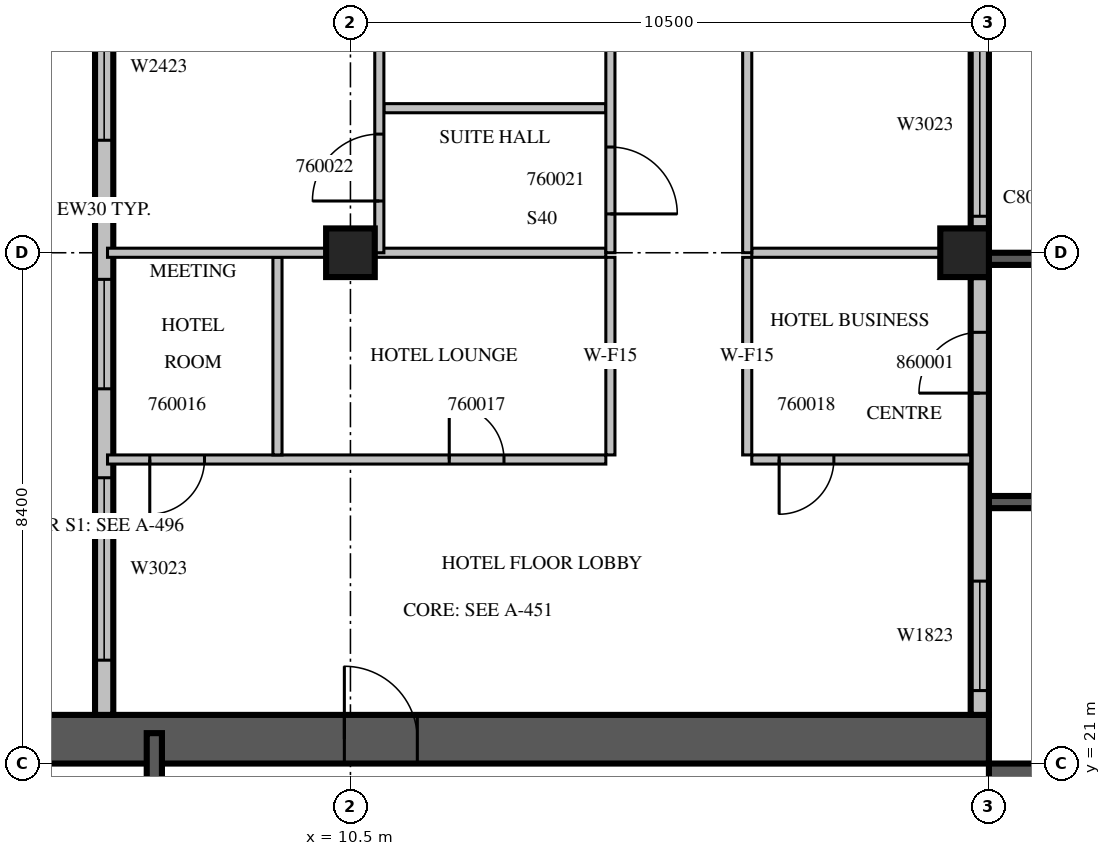
"""IFC4 building model, lengths in metres.
Left out: names, types, materials, properties, quantities, classifications, styles, units other than length and angle.
Written with IfcOpenShell. Run it as: python <this file> out.ifc"""

import sys

from ifc_helpers import new_model, si_unit, direction, frame, frame_2d, origin, origin_2d, place, context, subcontext, project, spatial, rectangle, extrude, source, transform, mapped, element, fill, save


model = new_model("IFC4")
c1 = context("Model", 3, precision=1e-05, world=origin(), true_north=direction((0.0, 1.0)))
c2 = subcontext(c1, "Body", "Model", "MODEL_VIEW")
j1 = project(units=[si_unit("LENGTHUNIT", "METRE"), si_unit("PLANEANGLEUNIT", "RADIAN")], contexts=[c1])
p1 = place(None, origin())
s1 = spatial("IfcSite", under=j1, at=p1, CompositionType="ELEMENT")
p2 = place(p1, origin())
s2 = spatial("IfcBuilding", under=s1, at=p2, CompositionType="ELEMENT")
p3 = place(p2, frame((0.0, 0.0, 261.4)))
s3 = spatial("IfcBuildingStorey", under=s2, at=p3, CompositionType="ELEMENT", Elevation=261.4)
m1 = source(origin(), c2, "Body", "SweptSolid", [
    extrude(rectangle(XDim=0.8, YDim=0.8, at=origin_2d()), origin(), (0.0, 0.0, 1.0), 3.8),
])
for number, where, z_axis, x_axis in (
    (1, (10.5, 29.4, 0.0), (0.0, 0.0, 1.0), (1.0, 0.0, 0.0)),
    (2, (20.6, 29.4, 0.0), (0.0, 0.0, 1.0), (1.0, 0.0, 0.0)),
):
    element("IfcColumn", number, at=place(p3, frame(where, z_axis=z_axis, x_axis=x_axis)), inside=s3, PredefinedType="COLUMN", context=c2, shape_type="MappedRepresentation", body=[
        mapped(m1, transform((0.0, 0.0, 0.0), scale=1.0)),
    ])
m2 = source(origin(), c2, "Body", "SweptSolid", [
    extrude(rectangle(XDim=16.8, YDim=0.8, at=frame_2d((8.4, 0.0))), origin(), (0.0, 0.0, 1.0), 3.8),
])
p4 = place(p3, frame((21.4, 4.2, 0.0), z_axis=(0.0, 0.0, 1.0), x_axis=(0.0, 1.0, 0.0)))
e3 = element("IfcWall", 3, at=p4, inside=s3, PredefinedType="SHEAR", context=c2, shape_type="MappedRepresentation", body=[
    mapped(m2, transform((0.0, 0.0, 0.0), scale=1.0)),
])
m3 = source(origin(), c2, "Body", "SweptSolid", [
    extrude(rectangle(XDim=1.2, YDim=2.1, at=frame_2d((0.6, 1.05))), frame((0.0, 0.41, 0.0), z_axis=(0.0, -1.0, 0.0), x_axis=(1.0, 0.0, 0.0)), (0.0, 0.0, 1.0), 0.82),
])
p5 = place(p4, frame((14.7, 0.0, 0.0)))
e4 = element("IfcOpeningElement", 4, at=p5, cuts=e3, PredefinedType="OPENING", context=c2, shape_type="MappedRepresentation", body=[
    mapped(m3, transform((0.0, 0.0, 0.0), scale=1.0)),
])
p6 = place(p3, frame((4.2, 21.4, 0.0), z_axis=(0.0, 0.0, 1.0), x_axis=(1.0, 0.0, 0.0)))
e5 = element("IfcWall", 5, at=p6, inside=s3, PredefinedType="SHEAR", context=c2, shape_type="MappedRepresentation", body=[
    mapped(m2, transform((0.0, 0.0, 0.0), scale=1.0)),
])
p7 = place(p6, frame((6.2, 0.0, 0.0)))
e6 = element("IfcOpeningElement", 6, at=p7, cuts=e5, PredefinedType="OPENING", context=c2, shape_type="MappedRepresentation", body=[
    mapped(m3, transform((0.0, 0.0, 0.0), scale=1.0)),
])
m4 = source(origin(), c2, "Body", "SweptSolid", [
    extrude(rectangle(XDim=3.9, YDim=0.2, at=frame_2d((1.95, 0.0))), origin(), (0.0, 0.0, 1.0), 3.4),
])
p8 = place(p3, frame((21.0, 25.3, 0.0), z_axis=(0.0, 0.0, 1.0), x_axis=(1.0, 0.0, 0.0)))
e7 = element("IfcWall", 7, at=p8, inside=s3, PredefinedType="SOLIDWALL", context=c2, shape_type="MappedRepresentation", body=[
    mapped(m4, transform((0.0, 0.0, 0.0), scale=1.0)),
])
m5 = source(origin(), c2, "Body", "SweptSolid", [
    extrude(rectangle(XDim=2.4, YDim=2.3, at=frame_2d((1.2, 1.15))), frame((0.0, 0.11, 0.0), z_axis=(0.0, -1.0, 0.0), x_axis=(1.0, 0.0, 0.0)), (0.0, 0.0, 1.0), 0.22),
])
p9 = place(p8, frame((0.75, 0.0, 0.6)))
e8 = element("IfcOpeningElement", 8, at=p9, cuts=e7, PredefinedType="OPENING", context=c2, shape_type="MappedRepresentation", body=[
    mapped(m5, transform((0.0, 0.0, 0.0), scale=1.0)),
])
p10 = place(p3, frame((21.0, 29.3, 0.0), z_axis=(0.0, 0.0, 1.0), x_axis=(1.0, 0.0, 0.0)))
e9 = element("IfcWall", 9, at=p10, inside=s3, PredefinedType="SOLIDWALL", context=c2, shape_type="MappedRepresentation", body=[
    mapped(m4, transform((0.0, 0.0, 0.0), scale=1.0)),
])
p11 = place(p10, frame((0.75, 0.0, 0.6)))
e10 = element("IfcOpeningElement", 10, at=p11, cuts=e9, PredefinedType="OPENING", context=c2, shape_type="MappedRepresentation", body=[
    mapped(m5, transform((0.0, 0.0, 0.0), scale=1.0)),
])
m6 = source(origin(), c2, "Body", "SweptSolid", [
    extrude(rectangle(XDim=7.2, YDim=0.3, at=frame_2d((3.6, 0.0))), origin(), (0.0, 0.0, 1.0), 3.4),
])
p12 = place(p3, frame((20.85, 21.8, 0.0), z_axis=(0.0, 0.0, 1.0), x_axis=(0.0, 1.0, 0.0)))
e11 = element("IfcWall", 11, at=p12, inside=s3, PredefinedType="STANDARD", context=c2, shape_type="MappedRepresentation", body=[
    mapped(m6, transform((0.0, 0.0, 0.0), scale=1.0)),
])
m7 = source(origin(), c2, "Body", "SweptSolid", [
    extrude(rectangle(XDim=1.8, YDim=2.3, at=frame_2d((0.9, 1.15))), frame((0.0, 0.16, 0.0), z_axis=(0.0, -1.0, 0.0), x_axis=(1.0, 0.0, 0.0)), (0.0, 0.0, 1.0), 0.32),
])
p13 = place(p12, frame((0.4, 0.0, 0.6)))
e12 = element("IfcOpeningElement", 12, at=p13, cuts=e11, PredefinedType="OPENING", context=c2, shape_type="MappedRepresentation", body=[
    mapped(m7, transform((0.0, 0.0, 0.0), scale=1.0)),
])
m8 = source(origin(), c2, "Body", "SweptSolid", [
    extrude(rectangle(XDim=1.0, YDim=2.1, at=frame_2d((0.5, 1.05))), frame((0.0, 0.16, 0.0), z_axis=(0.0, -1.0, 0.0), x_axis=(1.0, 0.0, 0.0)), (0.0, 0.0, 1.0), 0.32),
])
p14 = place(p12, frame((5.292, 0.0, 0.0)))
e13 = element("IfcOpeningElement", 13, at=p14, cuts=e11, PredefinedType="OPENING", context=c2, shape_type="MappedRepresentation", body=[
    mapped(m8, transform((0.0, 0.0, 0.0), scale=1.0)),
])
m9 = source(origin(), c2, "Body", "SweptSolid", [
    extrude(rectangle(XDim=7.6, YDim=0.3, at=frame_2d((3.8, 0.0))), origin(), (0.0, 0.0, 1.0), 3.4),
])
p15 = place(p3, frame((20.85, 29.8, 0.0), z_axis=(0.0, 0.0, 1.0), x_axis=(0.0, 1.0, 0.0)))
e14 = element("IfcWall", 14, at=p15, inside=s3, PredefinedType="STANDARD", context=c2, shape_type="MappedRepresentation", body=[
    mapped(m9, transform((0.0, 0.0, 0.0), scale=1.0)),
])
m10 = source(origin(), c2, "Body", "SweptSolid", [
    extrude(rectangle(XDim=3.0, YDim=2.3, at=frame_2d((1.5, 1.15))), frame((0.0, 0.16, 0.0), z_axis=(0.0, -1.0, 0.0), x_axis=(1.0, 0.0, 0.0)), (0.0, 0.0, 1.0), 0.32),
])
p16 = place(p15, frame((0.2, 0.0, 0.6)))
e15 = element("IfcOpeningElement", 15, at=p16, cuts=e14, PredefinedType="OPENING", context=c2, shape_type="MappedRepresentation", body=[
    mapped(m10, transform((0.0, 0.0, 0.0), scale=1.0)),
])
p17 = place(p15, frame((5.4, 0.0, 0.0)))
e16 = element("IfcOpeningElement", 16, at=p17, cuts=e14, PredefinedType="OPENING", context=c2, shape_type="MappedRepresentation", body=[
    mapped(m8, transform((0.0, 0.0, 0.0), scale=1.0)),
])
m11 = source(origin(), c2, "Body", "SweptSolid", [
    extrude(rectangle(XDim=16.6, YDim=0.3, at=frame_2d((8.3, 0.0))), origin(), (0.0, 0.0, 1.0), 3.4),
])
p18 = place(p3, frame((6.45, 38.4, 0.0), z_axis=(0.0, 0.0, 1.0), x_axis=(0.0, -1.0, 0.0)))
e17 = element("IfcWall", 17, at=p18, inside=s3, PredefinedType="STANDARD", context=c2, shape_type="MappedRepresentation", body=[
    mapped(m11, transform((0.0, 0.0, 0.0), scale=1.0)),
])
p19 = place(p18, frame((1.15, 0.0, 0.6)))
e18 = element("IfcOpeningElement", 18, at=p19, cuts=e17, PredefinedType="OPENING", context=c2, shape_type="MappedRepresentation", body=[
    mapped(m7, transform((0.0, 0.0, 0.0), scale=1.0)),
])
m12 = source(origin(), c2, "Body", "SweptSolid", [
    extrude(rectangle(XDim=2.4, YDim=2.3, at=frame_2d((1.2, 1.15))), frame((0.0, 0.16, 0.0), z_axis=(0.0, -1.0, 0.0), x_axis=(1.0, 0.0, 0.0)), (0.0, 0.0, 1.0), 0.32),
])
p20 = place(p18, frame((4.75, 0.0, 0.6)))
e19 = element("IfcOpeningElement", 19, at=p20, cuts=e17, PredefinedType="OPENING", context=c2, shape_type="MappedRepresentation", body=[
    mapped(m12, transform((0.0, 0.0, 0.0), scale=1.0)),
])
p21 = place(p18, frame((9.438, 0.0, 0.6)))
e20 = element("IfcOpeningElement", 20, at=p21, cuts=e17, PredefinedType="OPENING", context=c2, shape_type="MappedRepresentation", body=[
    mapped(m7, transform((0.0, 0.0, 0.0), scale=1.0)),
])
p22 = place(p18, frame((12.7, 0.0, 0.6)))
e21 = element("IfcOpeningElement", 21, at=p22, cuts=e17, PredefinedType="OPENING", context=c2, shape_type="MappedRepresentation", body=[
    mapped(m10, transform((0.0, 0.0, 0.0), scale=1.0)),
])
m13 = source(origin(), c2, "Body", "SweptSolid", [
    extrude(rectangle(XDim=6.6, YDim=0.25, at=frame_2d((3.3, 0.0))), origin(), (0.0, 0.0, 1.0), 3.4),
])
p23 = place(p3, frame((7.275, 14.9, 0.0), z_axis=(0.0, 0.0, 1.0), x_axis=(0.0, 1.0, 0.0)))
e22 = element("IfcWall", 22, at=p23, inside=s3, PredefinedType="SOLIDWALL", context=c2, shape_type="MappedRepresentation", body=[
    mapped(m13, transform((0.0, 0.0, 0.0), scale=1.0)),
])
m14 = source(origin(), c2, "Body", "SweptSolid", [
    extrude(rectangle(XDim=1.1, YDim=2.1, at=frame_2d((0.55, 1.05))), frame((0.0, 0.135, 0.0), z_axis=(0.0, -1.0, 0.0), x_axis=(1.0, 0.0, 0.0)), (0.0, 0.0, 1.0), 0.27),
])
p24 = place(p23, frame((0.15, 0.0, 0.0)))
e23 = element("IfcOpeningElement", 23, at=p24, cuts=e22, PredefinedType="OPENING", context=c2, shape_type="MappedRepresentation", body=[
    mapped(m14, transform((0.0, 0.0, 0.0), scale=1.0)),
])
m15 = source(origin(), c2, "Body", "SweptSolid", [
    extrude(rectangle(XDim=8.195, YDim=0.15, at=frame_2d((4.098, 0.0))), origin(), (0.0, 0.0, 1.0), 3.4),
])
p25 = place(p3, frame((6.505, 26.0, 0.0), z_axis=(0.0, 0.0, 1.0), x_axis=(1.0, 0.0, 0.0)))
e24 = element("IfcWall", 24, at=p25, inside=s3, PredefinedType="PARTITIONING", context=c2, shape_type="MappedRepresentation", body=[
    mapped(m15, transform((0.0, 0.0, 0.0), scale=1.0)),
])
m16 = source(origin(), c2, "Body", "SweptSolid", [
    extrude(rectangle(XDim=0.9, YDim=2.1, at=frame_2d((0.45, 1.05))), frame((0.0, 0.085, 0.0), z_axis=(0.0, -1.0, 0.0), x_axis=(1.0, 0.0, 0.0)), (0.0, 0.0, 1.0), 0.17),
])
p26 = place(p25, frame((0.695, 0.0, 0.0)))
e25 = element("IfcOpeningElement", 25, at=p26, cuts=e24, PredefinedType="OPENING", context=c2, shape_type="MappedRepresentation", body=[
    mapped(m16, transform((0.0, 0.0, 0.0), scale=1.0)),
])
p27 = place(p25, frame((5.62, 0.0, 0.0)))
e26 = element("IfcOpeningElement", 26, at=p27, cuts=e24, PredefinedType="OPENING", context=c2, shape_type="MappedRepresentation", body=[
    mapped(m16, transform((0.0, 0.0, 0.0), scale=1.0)),
])
m17 = source(origin(), c2, "Body", "SweptSolid", [
    extrude(rectangle(XDim=3.6, YDim=0.15, at=frame_2d((1.8, 0.0))), origin(), (0.0, 0.0, 1.0), 3.4),
])
p28 = place(p3, frame((17.1, 26.0, 0.0), z_axis=(0.0, 0.0, 1.0), x_axis=(1.0, 0.0, 0.0)))
e27 = element("IfcWall", 27, at=p28, inside=s3, PredefinedType="PARTITIONING", context=c2, shape_type="MappedRepresentation", body=[
    mapped(m17, transform((0.0, 0.0, 0.0), scale=1.0)),
])
p29 = place(p28, frame((0.45, 0.0, 0.0)))
e28 = element("IfcOpeningElement", 28, at=p29, cuts=e27, PredefinedType="OPENING", context=c2, shape_type="MappedRepresentation", body=[
    mapped(m16, transform((0.0, 0.0, 0.0), scale=1.0)),
])
m18 = source(origin(), c2, "Body", "SweptSolid", [
    extrude(rectangle(XDim=3.25, YDim=0.15, at=frame_2d((1.625, 0.0))), origin(), (0.0, 0.0, 1.0), 3.4),
])
for number, where, z_axis, x_axis in (
    (29, (9.3, 26.075, 0.0), (0.0, 0.0, 1.0), (0.0, 1.0, 0.0)),
    (30, (14.775, 26.075, 0.0), (0.0, 0.0, 1.0), (0.0, 1.0, 0.0)),
    (31, (17.025, 29.325, 0.0), (0.0, 0.0, 1.0), (0.0, -1.0, 0.0)),
):
    element("IfcWall", number, at=place(p3, frame(where, z_axis=z_axis, x_axis=x_axis)), inside=s3, PredefinedType="PARTITIONING", context=c2, shape_type="MappedRepresentation", body=[
        mapped(m18, transform((0.0, 0.0, 0.0), scale=1.0)),
    ])
m19 = source(origin(), c2, "Body", "SweptSolid", [
    extrude(rectangle(XDim=3.596, YDim=0.15, at=frame_2d((1.798, 0.0))), origin(), (0.0, 0.0, 1.0), 3.4),
])
p30 = place(p3, frame((10.101, 29.4, 0.0), z_axis=(0.0, 0.0, 1.0), x_axis=(-1.0, 0.0, 0.0)))
e32 = element("IfcWall", 32, at=p30, inside=s3, PredefinedType="PARTITIONING", context=c2, shape_type="MappedRepresentation", body=[
    mapped(m19, transform((0.0, 0.0, 0.0), scale=1.0)),
])
m20 = source(origin(), c2, "Body", "SweptSolid", [
    extrude(rectangle(XDim=3.801, YDim=0.15, at=frame_2d((1.901, 0.0))), origin(), (0.0, 0.0, 1.0), 3.4),
])
p31 = place(p3, frame((14.7, 29.4, 0.0), z_axis=(0.0, 0.0, 1.0), x_axis=(-1.0, 0.0, 0.0)))
e33 = element("IfcWall", 33, at=p31, inside=s3, PredefinedType="PARTITIONING", context=c2, shape_type="MappedRepresentation", body=[
    mapped(m20, transform((0.0, 0.0, 0.0), scale=1.0)),
])
m21 = source(origin(), c2, "Body", "SweptSolid", [
    extrude(rectangle(XDim=3.101, YDim=0.15, at=frame_2d((1.55, 0.0))), origin(), (0.0, 0.0, 1.0), 3.4),
])
p32 = place(p3, frame((20.201, 29.4, 0.0), z_axis=(0.0, 0.0, 1.0), x_axis=(-1.0, 0.0, 0.0)))
e34 = element("IfcWall", 34, at=p32, inside=s3, PredefinedType="PARTITIONING", context=c2, shape_type="MappedRepresentation", body=[
    mapped(m21, transform((0.0, 0.0, 0.0), scale=1.0)),
])
m22 = source(origin(), c2, "Body", "SweptSolid", [
    extrude(rectangle(XDim=3.65, YDim=0.15, at=frame_2d((1.825, 0.0))), origin(), (0.0, 0.0, 1.0), 3.4),
])
p33 = place(p3, frame((14.7, 31.777, 0.0), z_axis=(0.0, 0.0, 1.0), x_axis=(-1.0, 0.0, 0.0)))
e35 = element("IfcWall", 35, at=p33, inside=s3, PredefinedType="PARTITIONING", context=c2, shape_type="MappedRepresentation", body=[
    mapped(m22, transform((0.0, 0.0, 0.0), scale=1.0)),
])
m23 = source(origin(), c2, "Body", "SweptSolid", [
    extrude(rectangle(XDim=8.4, YDim=0.15, at=frame_2d((4.2, 0.0))), origin(), (0.0, 0.0, 1.0), 3.4),
])
p34 = place(p3, frame((10.975, 29.4, 0.0), z_axis=(0.0, 0.0, 1.0), x_axis=(0.0, 1.0, 0.0)))
e36 = element("IfcWall", 36, at=p34, inside=s3, PredefinedType="PARTITIONING", context=c2, shape_type="MappedRepresentation", body=[
    mapped(m23, transform((0.0, 0.0, 0.0), scale=1.0)),
])
m24 = source(origin(), c2, "Body", "SweptSolid", [
    extrude(rectangle(XDim=1.1, YDim=2.1, at=frame_2d((0.55, 1.05))), frame((0.0, 0.085, 0.0), z_axis=(0.0, -1.0, 0.0), x_axis=(1.0, 0.0, 0.0)), (0.0, 0.0, 1.0), 0.17),
])
p35 = place(p34, frame((0.851, 0.0, 0.0)))
e37 = element("IfcOpeningElement", 37, at=p35, cuts=e36, PredefinedType="OPENING", context=c2, shape_type="MappedRepresentation", body=[
    mapped(m24, transform((0.0, 0.0, 0.0), scale=1.0)),
])
p36 = place(p34, frame((3.38, 0.0, 0.0)))
e38 = element("IfcOpeningElement", 38, at=p36, cuts=e36, PredefinedType="OPENING", context=c2, shape_type="MappedRepresentation", body=[
    mapped(m16, transform((0.0, 0.0, 0.0), scale=1.0)),
])
p37 = place(p34, frame((6.179, 0.0, 0.0)))
e39 = element("IfcOpeningElement", 39, at=p37, cuts=e36, PredefinedType="OPENING", context=c2, shape_type="MappedRepresentation", body=[
    mapped(m16, transform((0.0, 0.0, 0.0), scale=1.0)),
])
p38 = place(p3, frame((14.775, 29.4, 0.0), z_axis=(0.0, 0.0, 1.0), x_axis=(0.0, 1.0, 0.0)))
e40 = element("IfcWall", 40, at=p38, inside=s3, PredefinedType="PARTITIONING", context=c2, shape_type="MappedRepresentation", body=[
    mapped(m23, transform((0.0, 0.0, 0.0), scale=1.0)),
])
p39 = place(p38, frame((0.638, 0.0, 0.0)))
e41 = element("IfcOpeningElement", 41, at=p39, cuts=e40, PredefinedType="OPENING", context=c2, shape_type="MappedRepresentation", body=[
    mapped(m24, transform((0.0, 0.0, 0.0), scale=1.0)),
])
m25 = source(origin(), c2, "Body", "SweptSolid", [
    extrude(rectangle(XDim=19.86, YDim=0.15, at=frame_2d((9.93, 0.0))), origin(), (0.0, 0.0, 1.0), 3.4),
])
p40 = place(p3, frame((17.025, 49.26, 0.0), z_axis=(0.0, 0.0, 1.0), x_axis=(0.0, -1.0, 0.0)))
e42 = element("IfcWall", 42, at=p40, inside=s3, PredefinedType="PARTITIONING", context=c2, shape_type="MappedRepresentation", body=[
    mapped(m25, transform((0.0, 0.0, 0.0), scale=1.0)),
])
m26 = source(origin(), c2, "Body", "SweptSolid", [
    extrude(rectangle(XDim=1.2, YDim=2.1, at=frame_2d((0.6, 1.05))), frame((0.0, 0.085, 0.0), z_axis=(0.0, -1.0, 0.0), x_axis=(1.0, 0.0, 0.0)), (0.0, 0.0, 1.0), 0.17),
])
p41 = place(p40, frame((15.06, 0.0, 0.0)))
e43 = element("IfcOpeningElement", 43, at=p41, cuts=e42, PredefinedType="OPENING", context=c2, shape_type="MappedRepresentation", body=[
    mapped(m26, transform((0.0, 0.0, 0.0), scale=1.0)),
])
m27 = source(origin(), c2, "Body", "SweptSolid", [
    extrude(rectangle(XDim=1.0, YDim=2.1, at=frame_2d((0.5, 1.05))), frame((0.0, 0.085, 0.0), z_axis=(0.0, -1.0, 0.0), x_axis=(1.0, 0.0, 0.0)), (0.0, 0.0, 1.0), 0.17),
])
p42 = place(p40, frame((6.63, 0.0, 0.0)))
e44 = element("IfcOpeningElement", 44, at=p42, cuts=e42, PredefinedType="OPENING", context=c2, shape_type="MappedRepresentation", body=[
    mapped(m27, transform((0.0, 0.0, 0.0), scale=1.0)),
])
m28 = source(origin(), c2, "Body", "SweptSolid", [
    extrude(rectangle(XDim=1.8, YDim=2.3, at=frame_2d((0.9, 1.15))), frame((0.0, 0.03, 0.0), z_axis=(0.0, -1.0, 0.0), x_axis=(1.0, 0.0, 0.0)), (0.0, 0.0, 1.0), 0.06),
])
p43 = place(p13, origin())
e45 = element("IfcWindow", 45, at=p43, inside=s3, PartitioningType="SINGLE_PANEL", PredefinedType="WINDOW", context=c2, shape_type="MappedRepresentation", body=[
    mapped(m28, transform((0.0, 0.0, 0.0), scale=1.0)),
])
fill(e12, e45)
m29 = source(origin(), c2, "Body", "SweptSolid", [
    extrude(rectangle(XDim=3.0, YDim=2.3, at=frame_2d((1.5, 1.15))), frame((0.0, 0.03, 0.0), z_axis=(0.0, -1.0, 0.0), x_axis=(1.0, 0.0, 0.0)), (0.0, 0.0, 1.0), 0.06),
])
p44 = place(p16, origin())
e46 = element("IfcWindow", 46, at=p44, inside=s3, PartitioningType="SINGLE_PANEL", PredefinedType="WINDOW", context=c2, shape_type="MappedRepresentation", body=[
    mapped(m29, transform((0.0, 0.0, 0.0), scale=1.0)),
])
fill(e15, e46)
m30 = source(origin(), c2, "Body", "SweptSolid", [
    extrude(rectangle(XDim=2.4, YDim=2.3, at=frame_2d((1.2, 1.15))), frame((0.0, 0.03, 0.0), z_axis=(0.0, -1.0, 0.0), x_axis=(1.0, 0.0, 0.0)), (0.0, 0.0, 1.0), 0.06),
])
p45 = place(p20, origin())
e47 = element("IfcWindow", 47, at=p45, inside=s3, PartitioningType="SINGLE_PANEL", PredefinedType="WINDOW", context=c2, shape_type="MappedRepresentation", body=[
    mapped(m30, transform((0.0, 0.0, 0.0), scale=1.0)),
])
fill(e19, e47)
p46 = place(p21, origin())
e48 = element("IfcWindow", 48, at=p46, inside=s3, PartitioningType="SINGLE_PANEL", PredefinedType="WINDOW", context=c2, shape_type="MappedRepresentation", body=[
    mapped(m28, transform((0.0, 0.0, 0.0), scale=1.0)),
])
fill(e20, e48)
p47 = place(p22, origin())
e49 = element("IfcWindow", 49, at=p47, inside=s3, PartitioningType="SINGLE_PANEL", PredefinedType="WINDOW", context=c2, shape_type="MappedRepresentation", body=[
    mapped(m29, transform((0.0, 0.0, 0.0), scale=1.0)),
])
fill(e21, e49)
m31 = source(origin(), c2, "Body", "SweptSolid", [
    extrude(rectangle(XDim=1.2, YDim=2.1, at=frame_2d((0.6, 1.05))), frame((0.0, 0.025, 0.0), z_axis=(0.0, -1.0, 0.0), x_axis=(1.0, 0.0, 0.0)), (0.0, 0.0, 1.0), 0.05),
])
p48 = place(p7, origin())
e50 = element("IfcDoor", 50, at=p48, inside=s3, OperationType="SINGLE_SWING_LEFT", PredefinedType="DOOR", context=c2, shape_type="MappedRepresentation", body=[
    mapped(m31, transform((0.0, 0.0, 0.0), scale=1.0)),
])
fill(e6, e50)
m32 = source(origin(), c2, "Body", "SweptSolid", [
    extrude(rectangle(XDim=0.9, YDim=2.1, at=frame_2d((0.45, 1.05))), frame((0.0, 0.025, 0.0), z_axis=(0.0, -1.0, 0.0), x_axis=(1.0, 0.0, 0.0)), (0.0, 0.0, 1.0), 0.05),
])
p49 = place(p26, origin())
e51 = element("IfcDoor", 51, at=p49, inside=s3, OperationType="SINGLE_SWING_RIGHT", PredefinedType="DOOR", context=c2, shape_type="MappedRepresentation", body=[
    mapped(m32, transform((0.0, 0.0, 0.0), scale=1.0)),
])
fill(e25, e51)
p50 = place(p27, origin())
e52 = element("IfcDoor", 52, at=p50, inside=s3, OperationType="SINGLE_SWING_LEFT", PredefinedType="DOOR", context=c2, shape_type="MappedRepresentation", body=[
    mapped(m32, transform((0.0, 0.0, 0.0), scale=1.0)),
])
fill(e26, e52)
p51 = place(p29, origin())
e53 = element("IfcDoor", 53, at=p51, inside=s3, OperationType="SINGLE_SWING_RIGHT", PredefinedType="DOOR", context=c2, shape_type="MappedRepresentation", body=[
    mapped(m32, transform((0.0, 0.0, 0.0), scale=1.0)),
])
fill(e28, e53)
m33 = source(origin(), c2, "Body", "SweptSolid", [
    extrude(rectangle(XDim=1.1, YDim=2.1, at=frame_2d((0.55, 1.05))), frame((0.0, 0.025, 0.0), z_axis=(0.0, -1.0, 0.0), x_axis=(1.0, 0.0, 0.0)), (0.0, 0.0, 1.0), 0.05),
])
p52 = place(p39, origin())
e54 = element("IfcDoor", 54, at=p52, inside=s3, OperationType="SINGLE_SWING_RIGHT", PredefinedType="DOOR", context=c2, shape_type="MappedRepresentation", body=[
    mapped(m33, transform((0.0, 0.0, 0.0), scale=1.0)),
])
fill(e41, e54)
p53 = place(p35, origin())
e55 = element("IfcDoor", 55, at=p53, inside=s3, OperationType="SINGLE_SWING_LEFT", PredefinedType="DOOR", context=c2, shape_type="MappedRepresentation", body=[
    mapped(m33, transform((0.0, 0.0, 0.0), scale=1.0)),
])
fill(e37, e55)
m34 = source(origin(), c2, "Body", "SweptSolid", [
    extrude(rectangle(XDim=1.0, YDim=2.1, at=frame_2d((0.5, 1.05))), frame((0.0, 0.025, 0.0), z_axis=(0.0, -1.0, 0.0), x_axis=(1.0, 0.0, 0.0)), (0.0, 0.0, 1.0), 0.05),
])
p54 = place(p14, origin())
e56 = element("IfcDoor", 56, at=p54, inside=s3, OperationType="SINGLE_SWING_LEFT", PredefinedType="DOOR", context=c2, shape_type="MappedRepresentation", body=[
    mapped(m34, transform((0.0, 0.0, 0.0), scale=1.0)),
])
fill(e13, e56)
save(model, sys.argv[1])
